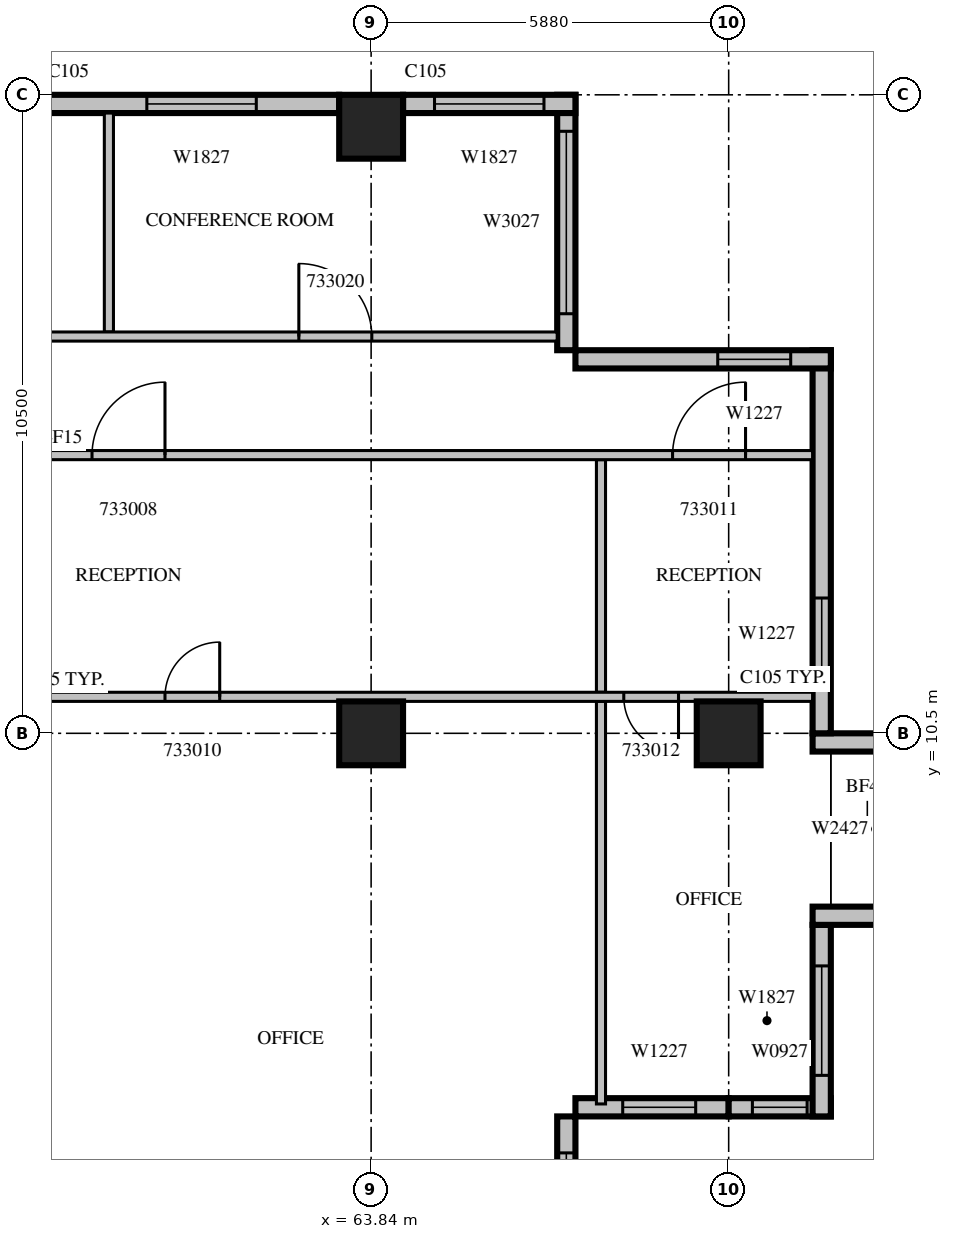
"""IFC4 building model, lengths in metres.
Left out: names, types, materials, properties, quantities, classifications, styles, units other than length and angle.
Written with IfcOpenShell. Run it as: python <this file> out.ifc"""

import sys

from ifc_helpers import new_model, si_unit, direction, frame, frame_2d, origin, origin_2d, place, context, subcontext, project, spatial, rectangle, extrude, source, transform, mapped, element, fill, save


model = new_model("IFC4")
c1 = context("Model", 3, precision=1e-05, world=origin(), true_north=direction((0.0, 1.0)))
c2 = subcontext(c1, "Body", "Model", "MODEL_VIEW")
j1 = project(units=[si_unit("LENGTHUNIT", "METRE"), si_unit("PLANEANGLEUNIT", "RADIAN")], contexts=[c1])
p1 = place(None, origin())
s1 = spatial("IfcSite", under=j1, at=p1, CompositionType="ELEMENT")
p2 = place(p1, origin())
s2 = spatial("IfcBuilding", under=s1, at=p2, CompositionType="ELEMENT")
p3 = place(p2, frame((0.0, 0.0, 149.7)))
s3 = spatial("IfcBuildingStorey", under=s2, at=p3, CompositionType="ELEMENT", Elevation=149.7)
m1 = source(origin(), c2, "Body", "SweptSolid", [
    extrude(rectangle(XDim=1.05, YDim=1.05, at=origin_2d()), origin(), (0.0, 0.0, 1.0), 4.2),
])
for number, where, z_axis, x_axis in (
    (1, (63.84, 10.5, 0.0), (0.0, 0.0, 1.0), (1.0, 0.0, 0.0)),
    (2, (69.72, 10.5, 0.0), (0.0, 0.0, 1.0), (1.0, 0.0, 0.0)),
    (3, (63.84, 20.475, 0.0), (0.0, 0.0, 1.0), (1.0, 0.0, 0.0)),
):
    element("IfcColumn", number, at=place(p3, frame(where, z_axis=z_axis, x_axis=x_axis)), inside=s3, PredefinedType="COLUMN", context=c2, shape_type="MappedRepresentation", body=[
        mapped(m1, transform((0.0, 0.0, 0.0), scale=1.0)),
    ])
m2 = source(origin(), c2, "Body", "SweptSolid", [
    extrude(rectangle(XDim=4.2, YDim=0.3, at=frame_2d((2.1, 0.0))), origin(), (0.0, 0.0, 1.0), 3.8),
])
p4 = place(p3, frame((67.05, 0.0, 0.0), z_axis=(0.0, 0.0, 1.0), x_axis=(0.0, 1.0, 0.0)))
e4 = element("IfcWall", 4, at=p4, inside=s3, PredefinedType="STANDARD", context=c2, shape_type="MappedRepresentation", body=[
    mapped(m2, transform((0.0, 0.0, 0.0), scale=1.0)),
])
m3 = source(origin(), c2, "Body", "SweptSolid", [
    extrude(rectangle(XDim=3.0, YDim=2.7, at=frame_2d((1.5, 1.35))), frame((0.0, 0.16, 0.0), z_axis=(0.0, -1.0, 0.0), x_axis=(1.0, 0.0, 0.0)), (0.0, 0.0, 1.0), 0.32),
])
p5 = place(p4, frame((0.6, 0.0, 0.6)))
e5 = element("IfcOpeningElement", 5, at=p5, cuts=e4, PredefinedType="OPENING", context=c2, shape_type="MappedRepresentation", body=[
    mapped(m3, transform((0.0, 0.0, 0.0), scale=1.0)),
])
m4 = source(origin(), c2, "Body", "SweptSolid", [
    extrude(rectangle(XDim=2.52, YDim=0.3, at=frame_2d((1.26, 0.0))), origin(), (0.0, 0.0, 1.0), 3.8),
])
p6 = place(p3, frame((67.2, 4.35, 0.0), z_axis=(0.0, 0.0, 1.0), x_axis=(1.0, 0.0, 0.0)))
e6 = element("IfcWall", 6, at=p6, inside=s3, PredefinedType="STANDARD", context=c2, shape_type="MappedRepresentation", body=[
    mapped(m4, transform((0.0, 0.0, 0.0), scale=1.0)),
])
m5 = source(origin(), c2, "Body", "SweptSolid", [
    extrude(rectangle(XDim=1.2, YDim=2.7, at=frame_2d((0.6, 1.35))), frame((0.0, 0.16, 0.0), z_axis=(0.0, -1.0, 0.0), x_axis=(1.0, 0.0, 0.0)), (0.0, 0.0, 1.0), 0.32),
])
p7 = place(p6, frame((0.777, 0.0, 0.6)))
e7 = element("IfcOpeningElement", 7, at=p7, cuts=e6, PredefinedType="OPENING", context=c2, shape_type="MappedRepresentation", body=[
    mapped(m5, transform((0.0, 0.0, 0.0), scale=1.0)),
])
m6 = source(origin(), c2, "Body", "SweptSolid", [
    extrude(rectangle(XDim=1.68, YDim=0.3, at=frame_2d((0.84, 0.0))), origin(), (0.0, 0.0, 1.0), 3.8),
])
p8 = place(p3, frame((69.72, 4.35, 0.0), z_axis=(0.0, 0.0, 1.0), x_axis=(1.0, 0.0, 0.0)))
e8 = element("IfcWall", 8, at=p8, inside=s3, PredefinedType="STANDARD", context=c2, shape_type="MappedRepresentation", body=[
    mapped(m6, transform((0.0, 0.0, 0.0), scale=1.0)),
])
m7 = source(origin(), c2, "Body", "SweptSolid", [
    extrude(rectangle(XDim=0.9, YDim=2.7, at=frame_2d((0.45, 1.35))), frame((0.0, 0.16, 0.0), z_axis=(0.0, -1.0, 0.0), x_axis=(1.0, 0.0, 0.0)), (0.0, 0.0, 1.0), 0.32),
])
p9 = place(p8, frame((0.39, 0.0, 0.6)))
e9 = element("IfcOpeningElement", 9, at=p9, cuts=e8, PredefinedType="OPENING", context=c2, shape_type="MappedRepresentation", body=[
    mapped(m7, transform((0.0, 0.0, 0.0), scale=1.0)),
])
m8 = source(origin(), c2, "Body", "SweptSolid", [
    extrude(rectangle(XDim=3.15, YDim=0.3, at=frame_2d((1.575, 0.0))), origin(), (0.0, 0.0, 1.0), 3.8),
])
p10 = place(p3, frame((71.25, 4.2, 0.0), z_axis=(0.0, 0.0, 1.0), x_axis=(0.0, 1.0, 0.0)))
e10 = element("IfcWall", 10, at=p10, inside=s3, PredefinedType="STANDARD", context=c2, shape_type="MappedRepresentation", body=[
    mapped(m8, transform((0.0, 0.0, 0.0), scale=1.0)),
])
m9 = source(origin(), c2, "Body", "SweptSolid", [
    extrude(rectangle(XDim=1.8, YDim=2.7, at=frame_2d((0.9, 1.35))), frame((0.0, 0.16, 0.0), z_axis=(0.0, -1.0, 0.0), x_axis=(1.0, 0.0, 0.0)), (0.0, 0.0, 1.0), 0.32),
])
p11 = place(p10, frame((0.675, 0.0, 0.6)))
e11 = element("IfcOpeningElement", 11, at=p11, cuts=e10, PredefinedType="OPENING", context=c2, shape_type="MappedRepresentation", body=[
    mapped(m9, transform((0.0, 0.0, 0.0), scale=1.0)),
])
m10 = source(origin(), c2, "Body", "SweptSolid", [
    extrude(rectangle(XDim=1.2, YDim=0.3, at=frame_2d((0.6, 0.0))), origin(), (0.0, 0.0, 1.0), 3.8),
])
for number, where, z_axis, x_axis in (
    (12, (71.1, 7.5, 0.0), (0.0, 0.0, 1.0), (1.0, 0.0, 0.0)),
    (13, (71.1, 10.35, 0.0), (0.0, 0.0, 1.0), (1.0, 0.0, 0.0)),
):
    element("IfcWall", number, at=place(p3, frame(where, z_axis=z_axis, x_axis=x_axis)), inside=s3, PredefinedType="STANDARD", context=c2, shape_type="MappedRepresentation", body=[
        mapped(m10, transform((0.0, 0.0, 0.0), scale=1.0)),
    ])
m11 = source(origin(), c2, "Body", "SweptSolid", [
    extrude(rectangle(XDim=6.3, YDim=0.3, at=frame_2d((3.15, 0.0))), origin(), (0.0, 0.0, 1.0), 3.8),
])
p12 = place(p3, frame((71.25, 10.5, 0.0), z_axis=(0.0, 0.0, 1.0), x_axis=(0.0, 1.0, 0.0)))
e14 = element("IfcWall", 14, at=p12, inside=s3, PredefinedType="STANDARD", context=c2, shape_type="MappedRepresentation", body=[
    mapped(m11, transform((0.0, 0.0, 0.0), scale=1.0)),
])
p13 = place(p12, frame((1.025, 0.0, 0.6)))
e15 = element("IfcOpeningElement", 15, at=p13, cuts=e14, PredefinedType="OPENING", context=c2, shape_type="MappedRepresentation", body=[
    mapped(m5, transform((0.0, 0.0, 0.0), scale=1.0)),
])
p14 = place(p3, frame((71.4, 16.65, 0.0), z_axis=(0.0, 0.0, 1.0), x_axis=(-1.0, 0.0, 0.0)))
e16 = element("IfcWall", 16, at=p14, inside=s3, PredefinedType="STANDARD", context=c2, shape_type="MappedRepresentation", body=[
    mapped(m2, transform((0.0, 0.0, 0.0), scale=1.0)),
])
p15 = place(p14, frame((0.66, 0.0, 0.6)))
e17 = element("IfcOpeningElement", 17, at=p15, cuts=e16, PredefinedType="OPENING", context=c2, shape_type="MappedRepresentation", body=[
    mapped(m5, transform((0.0, 0.0, 0.0), scale=1.0)),
])
p16 = place(p3, frame((67.05, 16.8, 0.0), z_axis=(0.0, 0.0, 1.0), x_axis=(0.0, 1.0, 0.0)))
e18 = element("IfcWall", 18, at=p16, inside=s3, PredefinedType="STANDARD", context=c2, shape_type="MappedRepresentation", body=[
    mapped(m2, transform((0.0, 0.0, 0.0), scale=1.0)),
])
p17 = place(p16, frame((0.6, 0.0, 0.6)))
e19 = element("IfcOpeningElement", 19, at=p17, cuts=e18, PredefinedType="OPENING", context=c2, shape_type="MappedRepresentation", body=[
    mapped(m3, transform((0.0, 0.0, 0.0), scale=1.0)),
])
m12 = source(origin(), c2, "Body", "SweptSolid", [
    extrude(rectangle(XDim=2.835, YDim=0.3, at=frame_2d((1.417, 0.0))), origin(), (0.0, 0.0, 1.0), 3.8),
])
p18 = place(p3, frame((67.2, 20.85, 0.0), z_axis=(0.0, 0.0, 1.0), x_axis=(-1.0, 0.0, 0.0)))
e20 = element("IfcWall", 20, at=p18, inside=s3, PredefinedType="STANDARD", context=c2, shape_type="MappedRepresentation", body=[
    mapped(m12, transform((0.0, 0.0, 0.0), scale=1.0)),
])
p19 = place(p18, frame((0.517, 0.0, 0.6)))
e21 = element("IfcOpeningElement", 21, at=p19, cuts=e20, PredefinedType="OPENING", context=c2, shape_type="MappedRepresentation", body=[
    mapped(m9, transform((0.0, 0.0, 0.0), scale=1.0)),
])
m13 = source(origin(), c2, "Body", "SweptSolid", [
    extrude(rectangle(XDim=4.83, YDim=0.3, at=frame_2d((2.415, 0.0))), origin(), (0.0, 0.0, 1.0), 3.8),
])
p20 = place(p3, frame((63.315, 20.85, 0.0), z_axis=(0.0, 0.0, 1.0), x_axis=(-1.0, 0.0, 0.0)))
e22 = element("IfcWall", 22, at=p20, inside=s3, PredefinedType="STANDARD", context=c2, shape_type="MappedRepresentation", body=[
    mapped(m13, transform((0.0, 0.0, 0.0), scale=1.0)),
])
p21 = place(p20, frame((1.363, 0.0, 0.6)))
e23 = element("IfcOpeningElement", 23, at=p21, cuts=e22, PredefinedType="OPENING", context=c2, shape_type="MappedRepresentation", body=[
    mapped(m9, transform((0.0, 0.0, 0.0), scale=1.0)),
])
m14 = source(origin(), c2, "Body", "SweptSolid", [
    extrude(rectangle(XDim=6.62, YDim=0.15, at=frame_2d((3.31, 0.0))), origin(), (0.0, 0.0, 1.0), 3.8),
])
p22 = place(p3, frame((67.62, 4.405, 0.0), z_axis=(0.0, 0.0, 1.0), x_axis=(0.0, 1.0, 0.0)))
e24 = element("IfcWall", 24, at=p22, inside=s3, PredefinedType="PARTITIONING", context=c2, shape_type="MappedRepresentation", body=[
    mapped(m14, transform((0.0, 0.0, 0.0), scale=1.0)),
])
m15 = source(origin(), c2, "Body", "SweptSolid", [
    extrude(rectangle(XDim=3.825, YDim=0.15, at=frame_2d((1.913, 0.0))), origin(), (0.0, 0.0, 1.0), 3.8),
])
p23 = place(p3, frame((67.62, 11.175, 0.0), z_axis=(0.0, 0.0, 1.0), x_axis=(0.0, 1.0, 0.0)))
e25 = element("IfcWall", 25, at=p23, inside=s3, PredefinedType="PARTITIONING", context=c2, shape_type="MappedRepresentation", body=[
    mapped(m15, transform((0.0, 0.0, 0.0), scale=1.0)),
])
m16 = source(origin(), c2, "Body", "SweptSolid", [
    extrude(rectangle(XDim=24.9, YDim=0.15, at=frame_2d((12.45, 0.0))), origin(), (0.0, 0.0, 1.0), 3.8),
])
p24 = place(p3, frame((71.1, 11.1, 0.0), z_axis=(0.0, 0.0, 1.0), x_axis=(-1.0, 0.0, 0.0)))
e26 = element("IfcWall", 26, at=p24, inside=s3, PredefinedType="PARTITIONING", context=c2, shape_type="MappedRepresentation", body=[
    mapped(m16, transform((0.0, 0.0, 0.0), scale=1.0)),
])
m17 = source(origin(), c2, "Body", "SweptSolid", [
    extrude(rectangle(XDim=1.1, YDim=2.1, at=frame_2d((0.55, 1.05))), frame((0.0, 0.085, 0.0), z_axis=(0.0, -1.0, 0.0), x_axis=(1.0, 0.0, 0.0)), (0.0, 0.0, 1.0), 0.17),
])
p25 = place(p24, frame((19.988, 0.0, 0.0)))
e27 = element("IfcOpeningElement", 27, at=p25, cuts=e26, PredefinedType="OPENING", context=c2, shape_type="MappedRepresentation", body=[
    mapped(m17, transform((0.0, 0.0, 0.0), scale=1.0)),
])
m18 = source(origin(), c2, "Body", "SweptSolid", [
    extrude(rectangle(XDim=0.9, YDim=2.1, at=frame_2d((0.45, 1.05))), frame((0.0, 0.085, 0.0), z_axis=(0.0, -1.0, 0.0), x_axis=(1.0, 0.0, 0.0)), (0.0, 0.0, 1.0), 0.17),
])
p26 = place(p24, frame((15.63, 0.0, 0.0)))
e28 = element("IfcOpeningElement", 28, at=p26, cuts=e26, PredefinedType="OPENING", context=c2, shape_type="MappedRepresentation", body=[
    mapped(m18, transform((0.0, 0.0, 0.0), scale=1.0)),
])
p27 = place(p24, frame((9.75, 0.0, 0.0)))
e29 = element("IfcOpeningElement", 29, at=p27, cuts=e26, PredefinedType="OPENING", context=c2, shape_type="MappedRepresentation", body=[
    mapped(m18, transform((0.0, 0.0, 0.0), scale=1.0)),
])
p28 = place(p24, frame((2.205, 0.0, 0.0)))
e30 = element("IfcOpeningElement", 30, at=p28, cuts=e26, PredefinedType="OPENING", context=c2, shape_type="MappedRepresentation", body=[
    mapped(m18, transform((0.0, 0.0, 0.0), scale=1.0)),
])
m19 = source(origin(), c2, "Body", "SweptSolid", [
    extrude(rectangle(XDim=3.6, YDim=0.15, at=frame_2d((1.8, 0.0))), origin(), (0.0, 0.0, 1.0), 3.8),
])
p29 = place(p3, frame((59.528, 20.7, 0.0), z_axis=(0.0, 0.0, 1.0), x_axis=(0.0, -1.0, 0.0)))
e31 = element("IfcWall", 31, at=p29, inside=s3, PredefinedType="PARTITIONING", context=c2, shape_type="MappedRepresentation", body=[
    mapped(m19, transform((0.0, 0.0, 0.0), scale=1.0)),
])
p30 = place(p3, frame((71.1, 15.075, 0.0), z_axis=(0.0, 0.0, 1.0), x_axis=(-1.0, 0.0, 0.0)))
e32 = element("IfcWall", 32, at=p30, inside=s3, PredefinedType="PARTITIONING", context=c2, shape_type="MappedRepresentation", body=[
    mapped(m16, transform((0.0, 0.0, 0.0), scale=1.0)),
])
p31 = place(p30, frame((19.754, 0.0, 0.0)))
e33 = element("IfcOpeningElement", 33, at=p31, cuts=e32, PredefinedType="OPENING", context=c2, shape_type="MappedRepresentation", body=[
    mapped(m17, transform((0.0, 0.0, 0.0), scale=1.0)),
])
p32 = place(p30, frame((22.794, 0.0, 0.0)))
e34 = element("IfcOpeningElement", 34, at=p32, cuts=e32, PredefinedType="OPENING", context=c2, shape_type="MappedRepresentation", body=[
    mapped(m18, transform((0.0, 0.0, 0.0), scale=1.0)),
])
m20 = source(origin(), c2, "Body", "SweptSolid", [
    extrude(rectangle(XDim=1.2, YDim=2.1, at=frame_2d((0.6, 1.05))), frame((0.0, 0.085, 0.0), z_axis=(0.0, -1.0, 0.0), x_axis=(1.0, 0.0, 0.0)), (0.0, 0.0, 1.0), 0.17),
])
p33 = place(p30, frame((10.65, 0.0, 0.0)))
e35 = element("IfcOpeningElement", 35, at=p33, cuts=e32, PredefinedType="OPENING", context=c2, shape_type="MappedRepresentation", body=[
    mapped(m20, transform((0.0, 0.0, 0.0), scale=1.0)),
])
p34 = place(p30, frame((1.103, 0.0, 0.0)))
e36 = element("IfcOpeningElement", 36, at=p34, cuts=e32, PredefinedType="OPENING", context=c2, shape_type="MappedRepresentation", body=[
    mapped(m20, transform((0.0, 0.0, 0.0), scale=1.0)),
])
m21 = source(origin(), c2, "Body", "SweptSolid", [
    extrude(rectangle(XDim=37.5, YDim=0.15, at=frame_2d((18.75, 0.0))), origin(), (0.0, 0.0, 1.0), 3.8),
])
p35 = place(p3, frame((29.4, 17.025, 0.0), z_axis=(0.0, 0.0, 1.0), x_axis=(1.0, 0.0, 0.0)))
e37 = element("IfcWall", 37, at=p35, inside=s3, PredefinedType="PARTITIONING", context=c2, shape_type="MappedRepresentation", body=[
    mapped(m21, transform((0.0, 0.0, 0.0), scale=1.0)),
])
m22 = source(origin(), c2, "Body", "SweptSolid", [
    extrude(rectangle(XDim=1.0, YDim=2.1, at=frame_2d((0.5, 1.05))), frame((0.0, 0.085, 0.0), z_axis=(0.0, -1.0, 0.0), x_axis=(1.0, 0.0, 0.0)), (0.0, 0.0, 1.0), 0.17),
])
p36 = place(p35, frame((1.357, 0.0, 0.0)))
e38 = element("IfcOpeningElement", 38, at=p36, cuts=e37, PredefinedType="OPENING", context=c2, shape_type="MappedRepresentation", body=[
    mapped(m22, transform((0.0, 0.0, 0.0), scale=1.0)),
])
p37 = place(p35, frame((4.669, 0.0, 0.0)))
e39 = element("IfcOpeningElement", 39, at=p37, cuts=e37, PredefinedType="OPENING", context=c2, shape_type="MappedRepresentation", body=[
    mapped(m22, transform((0.0, 0.0, 0.0), scale=1.0)),
])
p38 = place(p35, frame((7.012, 0.0, 0.0)))
e40 = element("IfcOpeningElement", 40, at=p38, cuts=e37, PredefinedType="OPENING", context=c2, shape_type="MappedRepresentation", body=[
    mapped(m22, transform((0.0, 0.0, 0.0), scale=1.0)),
])
p39 = place(p35, frame((10.05, 0.0, 0.0)))
e41 = element("IfcOpeningElement", 41, at=p39, cuts=e37, PredefinedType="OPENING", context=c2, shape_type="MappedRepresentation", body=[
    mapped(m18, transform((0.0, 0.0, 0.0), scale=1.0)),
])
p40 = place(p35, frame((14.62, 0.0, 0.0)))
e42 = element("IfcOpeningElement", 42, at=p40, cuts=e37, PredefinedType="OPENING", context=c2, shape_type="MappedRepresentation", body=[
    mapped(m22, transform((0.0, 0.0, 0.0), scale=1.0)),
])
p41 = place(p35, frame((19.66, 0.0, 0.0)))
e43 = element("IfcOpeningElement", 43, at=p41, cuts=e37, PredefinedType="OPENING", context=c2, shape_type="MappedRepresentation", body=[
    mapped(m22, transform((0.0, 0.0, 0.0), scale=1.0)),
])
p42 = place(p35, frame((25.804, 0.0, 0.0)))
e44 = element("IfcOpeningElement", 44, at=p42, cuts=e37, PredefinedType="OPENING", context=c2, shape_type="MappedRepresentation", body=[
    mapped(m20, transform((0.0, 0.0, 0.0), scale=1.0)),
])
p43 = place(p35, frame((33.251, 0.0, 0.0)))
e45 = element("IfcOpeningElement", 45, at=p43, cuts=e37, PredefinedType="OPENING", context=c2, shape_type="MappedRepresentation", body=[
    mapped(m20, transform((0.0, 0.0, 0.0), scale=1.0)),
])
m23 = source(origin(), c2, "Body", "SweptSolid", [
    extrude(rectangle(XDim=3.0, YDim=2.7, at=frame_2d((1.5, 1.35))), frame((0.0, 0.03, 0.0), z_axis=(0.0, -1.0, 0.0), x_axis=(1.0, 0.0, 0.0)), (0.0, 0.0, 1.0), 0.06),
])
p44 = place(p5, origin())
e46 = element("IfcWindow", 46, at=p44, inside=s3, PartitioningType="SINGLE_PANEL", PredefinedType="WINDOW", context=c2, shape_type="MappedRepresentation", body=[
    mapped(m23, transform((0.0, 0.0, 0.0), scale=1.0)),
])
fill(e5, e46)
m24 = source(origin(), c2, "Body", "SweptSolid", [
    extrude(rectangle(XDim=1.2, YDim=2.7, at=frame_2d((0.6, 1.35))), frame((0.0, 0.03, 0.0), z_axis=(0.0, -1.0, 0.0), x_axis=(1.0, 0.0, 0.0)), (0.0, 0.0, 1.0), 0.06),
])
p45 = place(p7, origin())
e47 = element("IfcWindow", 47, at=p45, inside=s3, PartitioningType="SINGLE_PANEL", PredefinedType="WINDOW", context=c2, shape_type="MappedRepresentation", body=[
    mapped(m24, transform((0.0, 0.0, 0.0), scale=1.0)),
])
fill(e7, e47)
m25 = source(origin(), c2, "Body", "SweptSolid", [
    extrude(rectangle(XDim=0.9, YDim=2.7, at=frame_2d((0.45, 1.35))), frame((0.0, 0.03, 0.0), z_axis=(0.0, -1.0, 0.0), x_axis=(1.0, 0.0, 0.0)), (0.0, 0.0, 1.0), 0.06),
])
p46 = place(p9, origin())
e48 = element("IfcWindow", 48, at=p46, inside=s3, PartitioningType="SINGLE_PANEL", PredefinedType="WINDOW", context=c2, shape_type="MappedRepresentation", body=[
    mapped(m25, transform((0.0, 0.0, 0.0), scale=1.0)),
])
fill(e9, e48)
m26 = source(origin(), c2, "Body", "SweptSolid", [
    extrude(rectangle(XDim=1.8, YDim=2.7, at=frame_2d((0.9, 1.35))), frame((0.0, 0.03, 0.0), z_axis=(0.0, -1.0, 0.0), x_axis=(1.0, 0.0, 0.0)), (0.0, 0.0, 1.0), 0.06),
])
p47 = place(p11, origin())
e49 = element("IfcWindow", 49, at=p47, inside=s3, PartitioningType="SINGLE_PANEL", PredefinedType="WINDOW", context=c2, shape_type="MappedRepresentation", body=[
    mapped(m26, transform((0.0, 0.0, 0.0), scale=1.0)),
])
fill(e11, e49)
p48 = place(p13, origin())
e50 = element("IfcWindow", 50, at=p48, inside=s3, PartitioningType="SINGLE_PANEL", PredefinedType="WINDOW", context=c2, shape_type="MappedRepresentation", body=[
    mapped(m24, transform((0.0, 0.0, 0.0), scale=1.0)),
])
fill(e15, e50)
p49 = place(p15, origin())
e51 = element("IfcWindow", 51, at=p49, inside=s3, PartitioningType="SINGLE_PANEL", PredefinedType="WINDOW", context=c2, shape_type="MappedRepresentation", body=[
    mapped(m24, transform((0.0, 0.0, 0.0), scale=1.0)),
])
fill(e17, e51)
p50 = place(p17, origin())
e52 = element("IfcWindow", 52, at=p50, inside=s3, PartitioningType="SINGLE_PANEL", PredefinedType="WINDOW", context=c2, shape_type="MappedRepresentation", body=[
    mapped(m23, transform((0.0, 0.0, 0.0), scale=1.0)),
])
fill(e19, e52)
p51 = place(p21, origin())
e53 = element("IfcWindow", 53, at=p51, inside=s3, PartitioningType="SINGLE_PANEL", PredefinedType="WINDOW", context=c2, shape_type="MappedRepresentation", body=[
    mapped(m26, transform((0.0, 0.0, 0.0), scale=1.0)),
])
fill(e23, e53)
p52 = place(p19, origin())
e54 = element("IfcWindow", 54, at=p52, inside=s3, PartitioningType="SINGLE_PANEL", PredefinedType="WINDOW", context=c2, shape_type="MappedRepresentation", body=[
    mapped(m26, transform((0.0, 0.0, 0.0), scale=1.0)),
])
fill(e21, e54)
m27 = source(origin(), c2, "Body", "SweptSolid", [
    extrude(rectangle(XDim=1.2, YDim=2.1, at=frame_2d((0.6, 1.05))), frame((0.0, 0.025, 0.0), z_axis=(0.0, -1.0, 0.0), x_axis=(1.0, 0.0, 0.0)), (0.0, 0.0, 1.0), 0.05),
])
p53 = place(p33, origin())
e55 = element("IfcDoor", 55, at=p53, inside=s3, OperationType="SINGLE_SWING_RIGHT", PredefinedType="DOOR", context=c2, shape_type="MappedRepresentation", body=[
    mapped(m27, transform((0.0, 0.0, 0.0), scale=1.0)),
])
fill(e35, e55)
m28 = source(origin(), c2, "Body", "SweptSolid", [
    extrude(rectangle(XDim=0.9, YDim=2.1, at=frame_2d((0.45, 1.05))), frame((0.0, 0.025, 0.0), z_axis=(0.0, -1.0, 0.0), x_axis=(1.0, 0.0, 0.0)), (0.0, 0.0, 1.0), 0.05),
])
p54 = place(p27, origin())
e56 = element("IfcDoor", 56, at=p54, inside=s3, OperationType="SINGLE_SWING_RIGHT", PredefinedType="DOOR", context=c2, shape_type="MappedRepresentation", body=[
    mapped(m28, transform((0.0, 0.0, 0.0), scale=1.0)),
])
fill(e29, e56)
p55 = place(p34, origin())
e57 = element("IfcDoor", 57, at=p55, inside=s3, OperationType="SINGLE_SWING_RIGHT", PredefinedType="DOOR", context=c2, shape_type="MappedRepresentation", body=[
    mapped(m27, transform((0.0, 0.0, 0.0), scale=1.0)),
])
fill(e36, e57)
p56 = place(p28, origin())
e58 = element("IfcDoor", 58, at=p56, inside=s3, OperationType="SINGLE_SWING_LEFT", PredefinedType="DOOR", context=c2, shape_type="MappedRepresentation", body=[
    mapped(m28, transform((0.0, 0.0, 0.0), scale=1.0)),
])
fill(e30, e58)
p57 = place(p43, origin())
e59 = element("IfcDoor", 59, at=p57, inside=s3, OperationType="SINGLE_SWING_LEFT", PredefinedType="DOOR", context=c2, shape_type="MappedRepresentation", body=[
    mapped(m27, transform((0.0, 0.0, 0.0), scale=1.0)),
])
fill(e45, e59)
save(model, sys.argv[1])
